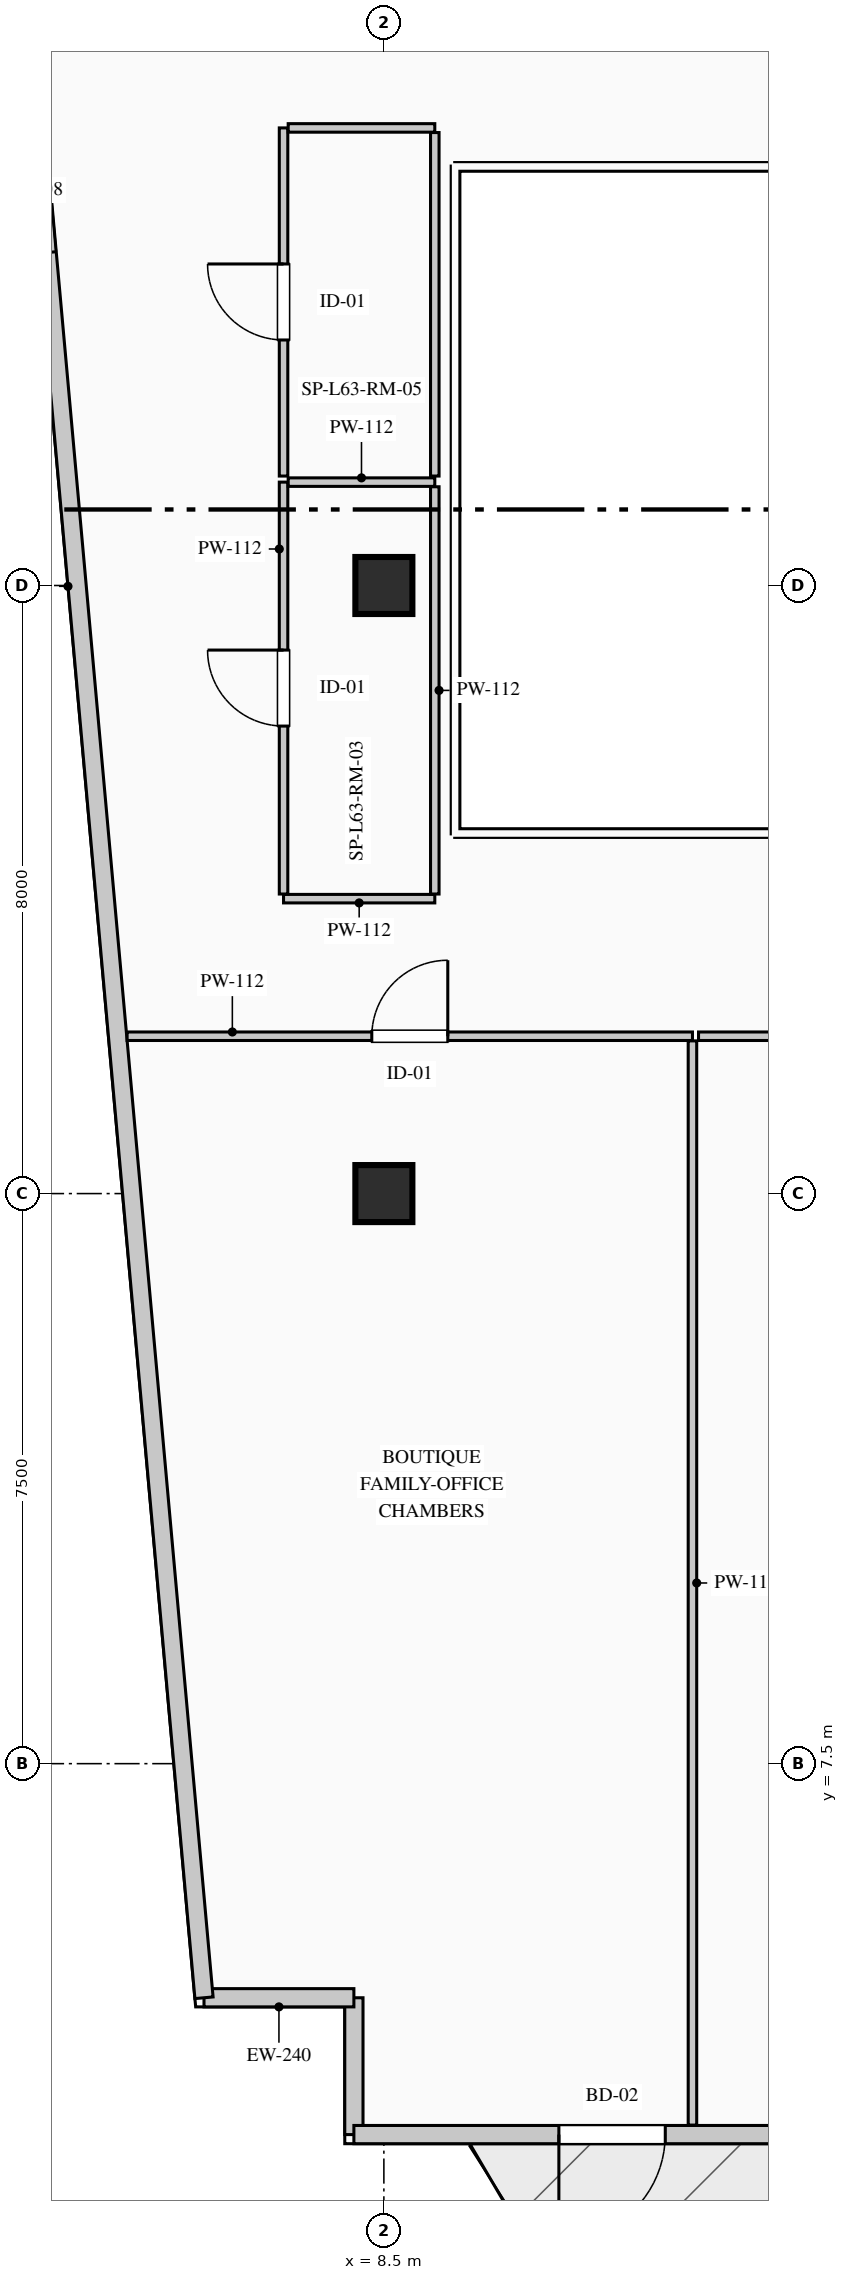
"""IFC4 building model, lengths in metres.
Left out: names, types, materials, properties, quantities, classifications, styles, units other than length and angle.
Written with IfcOpenShell. Run it as: python <this file> out.ifc"""

import sys

from ifc_helpers import new_model, si_unit, direction, frame, frame_2d, origin, origin_2d, place, context, subcontext, project, spatial, rectangle, extrude, element, fill, save


model = new_model("IFC4")
c1 = context("Model", 3, precision=1e-05, world=origin(), true_north=direction((0.0, 1.0)))
c2 = subcontext(c1, "Body", "Model", "MODEL_VIEW")
j1 = project(units=[si_unit("LENGTHUNIT", "METRE"), si_unit("PLANEANGLEUNIT", "RADIAN")], contexts=[c1])
p1 = place(None, origin())
s1 = spatial("IfcSite", under=j1, at=p1, CompositionType="ELEMENT")
p2 = place(p1, origin())
s2 = spatial("IfcBuilding", under=s1, at=p2, CompositionType="ELEMENT")
p3 = place(p2, frame((0.0, 0.0, 264.6)))
s3 = spatial("IfcBuildingStorey", under=s2, at=p3, CompositionType="ELEMENT", Elevation=264.6)
for number, where, z_axis, x_axis in (
    (1, (8.5, 15.0, 0.0), (0.0, 0.0, 1.0), (1.0, 0.0, 0.0)),
    (2, (8.5, 23.0, 0.0), (0.0, 0.0, 1.0), (1.0, 0.0, 0.0)),
):
    element("IfcColumn", number, at=place(p3, frame(where, z_axis=z_axis, x_axis=x_axis)), inside=s3, PredefinedType="COLUMN", context=c2, shape_type="SweptSolid", body=[
        extrude(rectangle(XDim=0.75, YDim=0.75, at=origin_2d()), origin(), (0.0, 0.0, 1.0), 3.95),
    ])
p4 = place(p3, frame((8.105, 2.62, 0.0), z_axis=(0.0, 0.0, 1.0), x_axis=(0.0, 1.0, 0.0)))
e3 = element("IfcWall", 3, at=p4, inside=s3, PredefinedType="STANDARD", context=c2, shape_type="SweptSolid", body=[
    extrude(rectangle(XDim=1.8, YDim=0.24, at=frame_2d((0.9, 0.0))), origin(), (0.0, 0.0, 1.0), 3.7),
])
p5 = place(p3, frame((8.105, 4.42, 0.0), z_axis=(0.0, 0.0, 1.0), x_axis=(-1.0, 0.0, 0.0)))
e4 = element("IfcWall", 4, at=p5, inside=s3, PredefinedType="STANDARD", context=c2, shape_type="SweptSolid", body=[
    extrude(rectangle(XDim=1.972, YDim=0.24, at=frame_2d((0.986, 0.0))), origin(), (0.0, 0.0, 1.0), 3.7),
])
p6 = place(p3, frame((6.133, 4.42, 0.0), z_axis=(0.0, 0.0, 1.0), x_axis=(-0.089522678378, 0.995984784048, 0.0)))
e5 = element("IfcWall", 5, at=p6, inside=s3, PredefinedType="STANDARD", context=c2, shape_type="SweptSolid", body=[
    extrude(rectangle(XDim=37.31, YDim=0.24, at=frame_2d((18.655, 0.0))), origin(), (0.0, 0.0, 1.0), 3.7),
])
p7 = place(p6, frame((23.053, 0.0, 0.9)))
e6 = element("IfcOpeningElement", 6, at=p7, cuts=e5, PredefinedType="OPENING", context=c2, shape_type="SweptSolid", body=[
    extrude(rectangle(XDim=1.65, YDim=1.95, at=frame_2d((0.825, 0.975))), frame((0.0, 0.13, 0.0), z_axis=(0.0, -1.0, 0.0), x_axis=(1.0, 0.0, 0.0)), (0.0, 0.0, 1.0), 0.26),
])
p8 = place(p3, frame((16.513, 2.62, 0.0), z_axis=(0.0, 0.0, 1.0), x_axis=(-1.0, 0.0, 0.0)))
e7 = element("IfcWall", 7, at=p8, inside=s3, PredefinedType="STANDARD", context=c2, shape_type="SweptSolid", body=[
    extrude(rectangle(XDim=8.408, YDim=0.24, at=frame_2d((4.204, 0.0))), origin(), (0.0, 0.0, 1.0), 3.7),
])
p9 = place(p8, frame((4.311, 0.0, 0.0)))
e8 = element("IfcOpeningElement", 8, at=p9, cuts=e7, PredefinedType="OPENING", context=c2, shape_type="SweptSolid", body=[
    extrude(rectangle(XDim=1.4, YDim=2.2, at=frame_2d((0.7, 1.1))), frame((0.0, 0.13, 0.0), z_axis=(0.0, -1.0, 0.0), x_axis=(1.0, 0.0, 0.0)), (0.0, 0.0, 1.0), 0.26),
])
p10 = place(p3, frame((5.122, 17.07, 0.0), z_axis=(0.0, 0.0, 1.0), x_axis=(1.0, 0.0, 0.0)))
e9 = element("IfcWall", 9, at=p10, inside=s3, PredefinedType="PARTITIONING", context=c2, shape_type="SweptSolid", body=[
    extrude(rectangle(XDim=7.438, YDim=0.112, at=frame_2d((3.719, 0.0))), origin(), (0.0, 0.0, 1.0), 3.7),
])
p11 = place(p10, frame((3.219, 0.0, 0.0)))
e10 = element("IfcOpeningElement", 10, at=p11, cuts=e9, PredefinedType="OPENING", context=c2, shape_type="SweptSolid", body=[
    extrude(rectangle(XDim=1.0, YDim=2.15, at=frame_2d((0.5, 1.075))), frame((0.0, 0.066, 0.0), z_axis=(0.0, -1.0, 0.0), x_axis=(1.0, 0.0, 0.0)), (0.0, 0.0, 1.0), 0.132),
])
p12 = place(p3, frame((12.56, 17.009, 0.0), z_axis=(0.0, 0.0, 1.0), x_axis=(0.0, -1.0, 0.0)))
e11 = element("IfcWall", 11, at=p12, inside=s3, PredefinedType="PARTITIONING", context=c2, shape_type="SweptSolid", body=[
    extrude(rectangle(XDim=14.264, YDim=0.112, at=frame_2d((7.132, 0.0))), origin(), (0.0, 0.0, 1.0), 3.7),
])
p13 = place(p3, frame((12.64, 17.07, 0.0), z_axis=(0.0, 0.0, 1.0), x_axis=(1.0, 0.0, 0.0)))
e12 = element("IfcWall", 12, at=p13, inside=s3, PredefinedType="PARTITIONING", context=c2, shape_type="SweptSolid", body=[
    extrude(rectangle(XDim=7.587, YDim=0.112, at=frame_2d((3.793, 0.0))), origin(), (0.0, 0.0, 1.0), 3.7),
])
p14 = place(p13, frame((3.293, 0.0, 0.0)))
e13 = element("IfcOpeningElement", 13, at=p14, cuts=e12, PredefinedType="OPENING", context=c2, shape_type="SweptSolid", body=[
    extrude(rectangle(XDim=1.0, YDim=2.15, at=frame_2d((0.5, 1.075))), frame((0.0, 0.066, 0.0), z_axis=(0.0, -1.0, 0.0), x_axis=(1.0, 0.0, 0.0)), (0.0, 0.0, 1.0), 0.132),
])
p15 = place(p3, frame((9.17, 18.88, 0.0), z_axis=(0.0, 0.0, 1.0), x_axis=(-1.0, 0.0, 0.0)))
e14 = element("IfcWall", 14, at=p15, inside=s3, PredefinedType="PARTITIONING", context=c2, shape_type="SweptSolid", body=[
    extrude(rectangle(XDim=1.99, YDim=0.112, at=frame_2d((0.995, 0.0))), origin(), (0.0, 0.0, 1.0), 3.7),
])
p16 = place(p3, frame((7.18, 18.941, 0.0), z_axis=(0.0, 0.0, 1.0), x_axis=(0.0, 1.0, 0.0)))
e15 = element("IfcWall", 15, at=p16, inside=s3, PredefinedType="PARTITIONING", context=c2, shape_type="SweptSolid", body=[
    extrude(rectangle(XDim=5.419, YDim=0.112, at=frame_2d((2.709, 0.0))), origin(), (0.0, 0.0, 1.0), 3.7),
])
p17 = place(p16, frame((2.209, 0.0, 0.0)))
e16 = element("IfcOpeningElement", 16, at=p17, cuts=e15, PredefinedType="OPENING", context=c2, shape_type="SweptSolid", body=[
    extrude(rectangle(XDim=1.0, YDim=2.15, at=frame_2d((0.5, 1.075))), frame((0.0, 0.066, 0.0), z_axis=(0.0, -1.0, 0.0), x_axis=(1.0, 0.0, 0.0)), (0.0, 0.0, 1.0), 0.132),
])
p18 = place(p3, frame((7.241, 24.36, 0.0), z_axis=(0.0, 0.0, 1.0), x_axis=(1.0, 0.0, 0.0)))
e17 = element("IfcWall", 17, at=p18, inside=s3, PredefinedType="PARTITIONING", context=c2, shape_type="SweptSolid", body=[
    extrude(rectangle(XDim=1.929, YDim=0.112, at=frame_2d((0.964, 0.0))), origin(), (0.0, 0.0, 1.0), 3.7),
])
p19 = place(p3, frame((9.17, 24.299, 0.0), z_axis=(0.0, 0.0, 1.0), x_axis=(0.0, -1.0, 0.0)))
e18 = element("IfcWall", 18, at=p19, inside=s3, PredefinedType="PARTITIONING", context=c2, shape_type="SweptSolid", body=[
    extrude(rectangle(XDim=5.358, YDim=0.112, at=frame_2d((2.679, 0.0))), origin(), (0.0, 0.0, 1.0), 3.385),
])
p20 = place(p3, frame((7.18, 24.44, 0.0), z_axis=(0.0, 0.0, 1.0), x_axis=(0.0, 1.0, 0.0)))
e19 = element("IfcWall", 19, at=p20, inside=s3, PredefinedType="PARTITIONING", context=c2, shape_type="SweptSolid", body=[
    extrude(rectangle(XDim=4.58, YDim=0.112, at=frame_2d((2.29, 0.0))), origin(), (0.0, 0.0, 1.0), 3.7),
])
p21 = place(p20, frame((1.79, 0.0, 0.0)))
e20 = element("IfcOpeningElement", 20, at=p21, cuts=e19, PredefinedType="OPENING", context=c2, shape_type="SweptSolid", body=[
    extrude(rectangle(XDim=1.0, YDim=2.15, at=frame_2d((0.5, 1.075))), frame((0.0, 0.066, 0.0), z_axis=(0.0, -1.0, 0.0), x_axis=(1.0, 0.0, 0.0)), (0.0, 0.0, 1.0), 0.132),
])
p22 = place(p3, frame((7.241, 29.02, 0.0), z_axis=(0.0, 0.0, 1.0), x_axis=(1.0, 0.0, 0.0)))
e21 = element("IfcWall", 21, at=p22, inside=s3, PredefinedType="PARTITIONING", context=c2, shape_type="SweptSolid", body=[
    extrude(rectangle(XDim=1.929, YDim=0.112, at=frame_2d((0.964, 0.0))), origin(), (0.0, 0.0, 1.0), 3.7),
])
p23 = place(p3, frame((9.17, 28.959, 0.0), z_axis=(0.0, 0.0, 1.0), x_axis=(0.0, -1.0, 0.0)))
e22 = element("IfcWall", 22, at=p23, inside=s3, PredefinedType="PARTITIONING", context=c2, shape_type="SweptSolid", body=[
    extrude(rectangle(XDim=4.519, YDim=0.112, at=frame_2d((2.26, 0.0))), origin(), (0.0, 0.0, 1.0), 3.385),
])
p24 = place(p9, origin())
e23 = element("IfcDoor", 23, at=p24, inside=s3, OperationType="SINGLE_SWING_RIGHT", PredefinedType="DOOR", context=c2, shape_type="SweptSolid", body=[
    extrude(rectangle(XDim=1.4, YDim=2.2, at=frame_2d((0.7, 1.1))), frame((0.0, 0.025, 0.0), z_axis=(0.0, -1.0, 0.0), x_axis=(1.0, 0.0, 0.0)), (0.0, 0.0, 1.0), 0.05),
])
fill(e8, e23)
p25 = place(p11, origin())
e24 = element("IfcDoor", 24, at=p25, inside=s3, OperationType="SINGLE_SWING_RIGHT", PredefinedType="DOOR", context=c2, shape_type="SweptSolid", body=[
    extrude(rectangle(XDim=1.0, YDim=2.15, at=frame_2d((0.5, 1.075))), frame((0.0, 0.025, 0.0), z_axis=(0.0, -1.0, 0.0), x_axis=(1.0, 0.0, 0.0)), (0.0, 0.0, 1.0), 0.05),
])
fill(e10, e24)
p26 = place(p17, origin())
e25 = element("IfcDoor", 25, at=p26, inside=s3, OperationType="SINGLE_SWING_RIGHT", PredefinedType="DOOR", context=c2, shape_type="SweptSolid", body=[
    extrude(rectangle(XDim=1.0, YDim=2.15, at=frame_2d((0.5, 1.075))), frame((0.0, 0.025, 0.0), z_axis=(0.0, -1.0, 0.0), x_axis=(1.0, 0.0, 0.0)), (0.0, 0.0, 1.0), 0.05),
])
fill(e16, e25)
p27 = place(p21, origin())
e26 = element("IfcDoor", 26, at=p27, inside=s3, OperationType="SINGLE_SWING_RIGHT", PredefinedType="DOOR", context=c2, shape_type="SweptSolid", body=[
    extrude(rectangle(XDim=1.0, YDim=2.15, at=frame_2d((0.5, 1.075))), frame((0.0, 0.025, 0.0), z_axis=(0.0, -1.0, 0.0), x_axis=(1.0, 0.0, 0.0)), (0.0, 0.0, 1.0), 0.05),
])
fill(e20, e26)
save(model, sys.argv[1])
